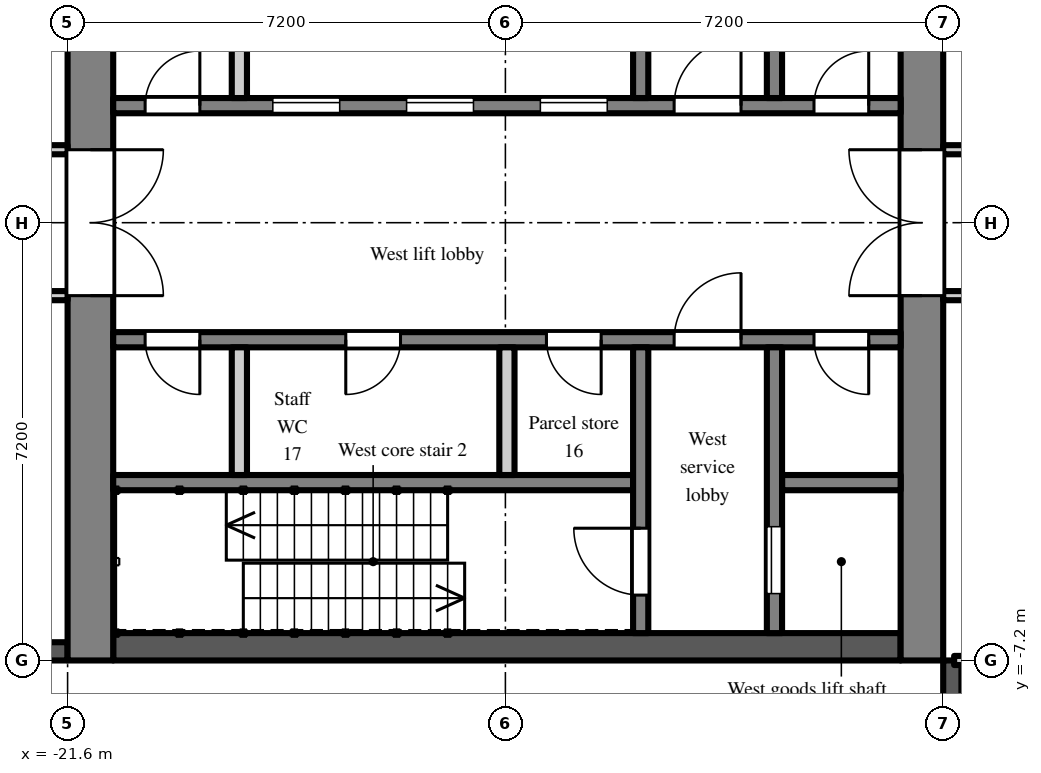
"""IFC4 building model, lengths in metres.
Left out: names, types, materials, properties, quantities, classifications, styles, units other than length and angle.
Written with IfcOpenShell. Run it as: python <this file> out.ifc"""

import sys

from ifc_helpers import new_model, si_unit, direction, frame, frame_2d, origin, place, context, subcontext, project, spatial, rectangle, extrude, element, fill, save


model = new_model("IFC4")
c1 = context("Model", 3, precision=1e-05, world=origin(), true_north=direction((0.0, 1.0)))
c2 = subcontext(c1, "Body", "Model", "MODEL_VIEW")
j1 = project(units=[si_unit("LENGTHUNIT", "METRE"), si_unit("PLANEANGLEUNIT", "RADIAN")], contexts=[c1])
p1 = place(None, origin())
s1 = spatial("IfcSite", under=j1, at=p1, CompositionType="ELEMENT")
p2 = place(p1, origin())
s2 = spatial("IfcBuilding", under=s1, at=p2, CompositionType="ELEMENT")
p3 = place(p2, frame((0.0, 0.0, 162.3)))
s3 = spatial("IfcBuildingStorey", under=s2, at=p3, CompositionType="ELEMENT", Elevation=162.3)
p4 = place(p3, frame((-24.3, -7.05, 0.0), z_axis=(0.0, 0.0, 1.0), x_axis=(1.0, 0.0, 0.0)))
e1 = element("IfcWall", 1, at=p4, inside=s3, PredefinedType="SOLIDWALL", context=c2, shape_type="SweptSolid", body=[
    extrude(rectangle(XDim=2.7, YDim=0.3, at=frame_2d((1.35, 0.0))), origin(), (0.0, 0.0, 1.0), 3.4),
])
p5 = place(p3, frame((-7.05, -7.2, 0.0), z_axis=(0.0, 0.0, 1.0), x_axis=(0.0, -1.0, 0.0)))
e2 = element("IfcWall", 2, at=p5, inside=s3, PredefinedType="SOLIDWALL", context=c2, shape_type="SweptSolid", body=[
    extrude(rectangle(XDim=7.2, YDim=0.3, at=frame_2d((3.6, 0.0))), origin(), (0.0, 0.0, 1.0), 3.8),
])
p6 = place(p3, frame((-7.55, -7.2, 0.0), z_axis=(0.0, 0.0, 1.0), x_axis=(0.0, 1.0, 0.0)))
e3 = element("IfcWall", 3, at=p6, inside=s3, PredefinedType="SHEAR", context=c2, shape_type="SweptSolid", body=[
    extrude(rectangle(XDim=14.4, YDim=0.7, at=frame_2d((7.2, 0.0))), origin(), (0.0, 0.0, 1.0), 3.8),
])
p7 = place(p6, frame((6.0, 0.0, 0.0)))
e4 = element("IfcOpeningElement", 4, at=p7, cuts=e3, PredefinedType="OPENING", context=c2, shape_type="SweptSolid", body=[
    extrude(rectangle(XDim=2.4, YDim=2.2, at=frame_2d((1.2, 1.1))), frame((0.0, 0.36, 0.0), z_axis=(0.0, -1.0, 0.0), x_axis=(1.0, 0.0, 0.0)), (0.0, 0.0, 1.0), 0.72),
])
p8 = place(p3, frame((-21.225, -7.2, 0.0), z_axis=(0.0, 0.0, 1.0), x_axis=(0.0, 1.0, 0.0)))
e5 = element("IfcWall", 5, at=p8, inside=s3, PredefinedType="SHEAR", context=c2, shape_type="SweptSolid", body=[
    extrude(rectangle(XDim=14.4, YDim=0.75, at=frame_2d((7.2, 0.0))), origin(), (0.0, 0.0, 1.0), 3.8),
])
p9 = place(p8, frame((6.0, 0.0, 0.0)))
e6 = element("IfcOpeningElement", 6, at=p9, cuts=e5, PredefinedType="OPENING", context=c2, shape_type="SweptSolid", body=[
    extrude(rectangle(XDim=2.4, YDim=2.2, at=frame_2d((1.2, 1.1))), frame((0.0, 0.385, 0.0), z_axis=(0.0, -1.0, 0.0), x_axis=(1.0, 0.0, 0.0)), (0.0, 0.0, 1.0), 0.77),
])
p10 = place(p3, frame((-7.9, 1.925, 0.0), z_axis=(0.0, 0.0, 1.0), x_axis=(-1.0, 0.0, 0.0)))
e7 = element("IfcWall", 7, at=p10, inside=s3, PredefinedType="SHEAR", context=c2, shape_type="SweptSolid", body=[
    extrude(rectangle(XDim=12.95, YDim=0.25, at=frame_2d((6.475, 0.0))), origin(), (0.0, 0.0, 1.0), 3.8),
])
p11 = place(p10, frame((4.825, 0.0, 0.0)))
e8 = element("IfcOpeningElement", 8, at=p11, cuts=e7, PredefinedType="OPENING", context=c2, shape_type="SweptSolid", body=[
    extrude(rectangle(XDim=1.1, YDim=2.1, at=frame_2d((0.55, 1.05))), frame((0.0, 0.135, 0.0), z_axis=(0.0, -1.0, 0.0), x_axis=(1.0, 0.0, 0.0)), (0.0, 0.0, 1.0), 0.27),
])
p12 = place(p10, frame((7.025, 0.0, 0.0)))
e9 = element("IfcOpeningElement", 9, at=p12, cuts=e7, PredefinedType="OPENING", context=c2, shape_type="SweptSolid", body=[
    extrude(rectangle(XDim=1.1, YDim=2.1, at=frame_2d((0.55, 1.05))), frame((0.0, 0.135, 0.0), z_axis=(0.0, -1.0, 0.0), x_axis=(1.0, 0.0, 0.0)), (0.0, 0.0, 1.0), 0.27),
])
p13 = place(p10, frame((9.225, 0.0, 0.0)))
e10 = element("IfcOpeningElement", 10, at=p13, cuts=e7, PredefinedType="OPENING", context=c2, shape_type="SweptSolid", body=[
    extrude(rectangle(XDim=1.1, YDim=2.1, at=frame_2d((0.55, 1.05))), frame((0.0, 0.135, 0.0), z_axis=(0.0, -1.0, 0.0), x_axis=(1.0, 0.0, 0.0)), (0.0, 0.0, 1.0), 0.27),
])
p14 = place(p10, frame((0.525, 0.0, 0.0)))
e11 = element("IfcOpeningElement", 11, at=p14, cuts=e7, PredefinedType="OPENING", context=c2, shape_type="SweptSolid", body=[
    extrude(rectangle(XDim=0.9, YDim=2.1, at=frame_2d((0.45, 1.05))), frame((0.0, 0.135, 0.0), z_axis=(0.0, -1.0, 0.0), x_axis=(1.0, 0.0, 0.0)), (0.0, 0.0, 1.0), 0.27),
])
p15 = place(p10, frame((2.625, 0.0, 0.0)))
e12 = element("IfcOpeningElement", 12, at=p15, cuts=e7, PredefinedType="OPENING", context=c2, shape_type="SweptSolid", body=[
    extrude(rectangle(XDim=1.1, YDim=2.1, at=frame_2d((0.55, 1.05))), frame((0.0, 0.135, 0.0), z_axis=(0.0, -1.0, 0.0), x_axis=(1.0, 0.0, 0.0)), (0.0, 0.0, 1.0), 0.27),
])
p16 = place(p10, frame((11.525, 0.0, 0.0)))
e13 = element("IfcOpeningElement", 13, at=p16, cuts=e7, PredefinedType="OPENING", context=c2, shape_type="SweptSolid", body=[
    extrude(rectangle(XDim=0.9, YDim=2.1, at=frame_2d((0.45, 1.05))), frame((0.0, 0.135, 0.0), z_axis=(0.0, -1.0, 0.0), x_axis=(1.0, 0.0, 0.0)), (0.0, 0.0, 1.0), 0.27),
])
p17 = place(p3, frame((-9.975, 2.05, 0.0), z_axis=(0.0, 0.0, 1.0), x_axis=(0.0, 1.0, 0.0)))
e14 = element("IfcWall", 14, at=p17, inside=s3, PredefinedType="SHEAR", context=c2, shape_type="SweptSolid", body=[
    extrude(rectangle(XDim=4.7, YDim=0.25, at=frame_2d((2.35, 0.0))), origin(), (0.0, 0.0, 1.0), 3.8),
])
p18 = place(p17, frame((2.95, 0.0, 0.0)))
e15 = element("IfcOpeningElement", 15, at=p18, cuts=e14, PredefinedType="OPENING", context=c2, shape_type="SweptSolid", body=[
    extrude(rectangle(XDim=1.1, YDim=2.1, at=frame_2d((0.55, 1.05))), frame((0.0, 0.135, 0.0), z_axis=(0.0, -1.0, 0.0), x_axis=(1.0, 0.0, 0.0)), (0.0, 0.0, 1.0), 0.27),
])
p19 = place(p3, frame((-12.175, 2.05, 0.0), z_axis=(0.0, 0.0, 1.0), x_axis=(0.0, 1.0, 0.0)))
e16 = element("IfcWall", 16, at=p19, inside=s3, PredefinedType="SHEAR", context=c2, shape_type="SweptSolid", body=[
    extrude(rectangle(XDim=4.7, YDim=0.25, at=frame_2d((2.35, 0.0))), origin(), (0.0, 0.0, 1.0), 3.8),
])
p20 = place(p19, frame((2.975, 0.0, 0.0)))
e17 = element("IfcOpeningElement", 17, at=p20, cuts=e16, PredefinedType="OPENING", context=c2, shape_type="SweptSolid", body=[
    extrude(rectangle(XDim=1.1, YDim=2.1, at=frame_2d((0.55, 1.05))), frame((0.0, 0.135, 0.0), z_axis=(0.0, -1.0, 0.0), x_axis=(1.0, 0.0, 0.0)), (0.0, 0.0, 1.0), 0.27),
])
p21 = place(p3, frame((-18.775, 2.05, 0.0), z_axis=(0.0, 0.0, 1.0), x_axis=(0.0, 1.0, 0.0)))
e18 = element("IfcWall", 18, at=p21, inside=s3, PredefinedType="PARTITIONING", context=c2, shape_type="SweptSolid", body=[
    extrude(rectangle(XDim=2.1, YDim=0.25, at=frame_2d((1.05, 0.0))), origin(), (0.0, 0.0, 1.0), 3.8),
])
p22 = place(p3, frame((-7.9, -6.975, 0.0), z_axis=(0.0, 0.0, 1.0), x_axis=(-1.0, 0.0, 0.0)))
e19 = element("IfcWall", 19, at=p22, inside=s3, PredefinedType="SHEAR", context=c2, shape_type="SweptSolid", body=[
    extrude(rectangle(XDim=12.95, YDim=0.45, at=frame_2d((6.475, 0.0))), origin(), (0.0, 0.0, 1.0), 3.8),
])
p23 = place(p3, frame((-7.9, -1.925, 0.0), z_axis=(0.0, 0.0, 1.0), x_axis=(-1.0, 0.0, 0.0)))
e20 = element("IfcWall", 20, at=p23, inside=s3, PredefinedType="SHEAR", context=c2, shape_type="SweptSolid", body=[
    extrude(rectangle(XDim=12.95, YDim=0.25, at=frame_2d((6.475, 0.0))), origin(), (0.0, 0.0, 1.0), 3.8),
])
p24 = place(p23, frame((0.525, 0.0, 0.0)))
e21 = element("IfcOpeningElement", 21, at=p24, cuts=e20, PredefinedType="OPENING", context=c2, shape_type="SweptSolid", body=[
    extrude(rectangle(XDim=0.9, YDim=2.1, at=frame_2d((0.45, 1.05))), frame((0.0, 0.135, 0.0), z_axis=(0.0, -1.0, 0.0), x_axis=(1.0, 0.0, 0.0)), (0.0, 0.0, 1.0), 0.27),
])
p25 = place(p23, frame((2.625, 0.0, 0.0)))
e22 = element("IfcOpeningElement", 22, at=p25, cuts=e20, PredefinedType="OPENING", context=c2, shape_type="SweptSolid", body=[
    extrude(rectangle(XDim=1.1, YDim=2.1, at=frame_2d((0.55, 1.05))), frame((0.0, 0.135, 0.0), z_axis=(0.0, -1.0, 0.0), x_axis=(1.0, 0.0, 0.0)), (0.0, 0.0, 1.0), 0.27),
])
p26 = place(p23, frame((4.925, 0.0, 0.0)))
e23 = element("IfcOpeningElement", 23, at=p26, cuts=e20, PredefinedType="OPENING", context=c2, shape_type="SweptSolid", body=[
    extrude(rectangle(XDim=0.9, YDim=2.1, at=frame_2d((0.45, 1.05))), frame((0.0, 0.135, 0.0), z_axis=(0.0, -1.0, 0.0), x_axis=(1.0, 0.0, 0.0)), (0.0, 0.0, 1.0), 0.27),
])
p27 = place(p23, frame((8.225, 0.0, 0.0)))
e24 = element("IfcOpeningElement", 24, at=p27, cuts=e20, PredefinedType="OPENING", context=c2, shape_type="SweptSolid", body=[
    extrude(rectangle(XDim=0.9, YDim=2.1, at=frame_2d((0.45, 1.05))), frame((0.0, 0.135, 0.0), z_axis=(0.0, -1.0, 0.0), x_axis=(1.0, 0.0, 0.0)), (0.0, 0.0, 1.0), 0.27),
])
p28 = place(p23, frame((11.525, 0.0, 0.0)))
e25 = element("IfcOpeningElement", 25, at=p28, cuts=e20, PredefinedType="OPENING", context=c2, shape_type="SweptSolid", body=[
    extrude(rectangle(XDim=0.9, YDim=2.1, at=frame_2d((0.45, 1.05))), frame((0.0, 0.135, 0.0), z_axis=(0.0, -1.0, 0.0), x_axis=(1.0, 0.0, 0.0)), (0.0, 0.0, 1.0), 0.27),
])
p29 = place(p3, frame((-7.9, -4.275, 0.0), z_axis=(0.0, 0.0, 1.0), x_axis=(-1.0, 0.0, 0.0)))
e26 = element("IfcWall", 26, at=p29, inside=s3, PredefinedType="SHEAR", context=c2, shape_type="SweptSolid", body=[
    extrude(rectangle(XDim=1.95, YDim=0.25, at=frame_2d((0.975, 0.0))), origin(), (0.0, 0.0, 1.0), 3.8),
])
p30 = place(p3, frame((-12.3, -4.275, 0.0), z_axis=(0.0, 0.0, 1.0), x_axis=(-1.0, 0.0, 0.0)))
e27 = element("IfcWall", 27, at=p30, inside=s3, PredefinedType="SHEAR", context=c2, shape_type="SweptSolid", body=[
    extrude(rectangle(XDim=8.55, YDim=0.25, at=frame_2d((4.275, 0.0))), origin(), (0.0, 0.0, 1.0), 3.8),
])
p31 = place(p3, frame((-9.975, -2.05, 0.0), z_axis=(0.0, 0.0, 1.0), x_axis=(0.0, -1.0, 0.0)))
e28 = element("IfcWall", 28, at=p31, inside=s3, PredefinedType="SHEAR", context=c2, shape_type="SweptSolid", body=[
    extrude(rectangle(XDim=4.7, YDim=0.25, at=frame_2d((2.35, 0.0))), origin(), (0.0, 0.0, 1.0), 3.8),
])
p32 = place(p31, frame((2.95, 0.0, 0.0)))
e29 = element("IfcOpeningElement", 29, at=p32, cuts=e28, PredefinedType="OPENING", context=c2, shape_type="SweptSolid", body=[
    extrude(rectangle(XDim=1.1, YDim=2.1, at=frame_2d((0.55, 1.05))), frame((0.0, 0.135, 0.0), z_axis=(0.0, -1.0, 0.0), x_axis=(1.0, 0.0, 0.0)), (0.0, 0.0, 1.0), 0.27),
])
p33 = place(p3, frame((-12.175, -2.05, 0.0), z_axis=(0.0, 0.0, 1.0), x_axis=(0.0, -1.0, 0.0)))
e30 = element("IfcWall", 30, at=p33, inside=s3, PredefinedType="SHEAR", context=c2, shape_type="SweptSolid", body=[
    extrude(rectangle(XDim=4.7, YDim=0.25, at=frame_2d((2.35, 0.0))), origin(), (0.0, 0.0, 1.0), 3.8),
])
p34 = place(p33, frame((2.975, 0.0, 0.0)))
e31 = element("IfcOpeningElement", 31, at=p34, cuts=e30, PredefinedType="OPENING", context=c2, shape_type="SweptSolid", body=[
    extrude(rectangle(XDim=1.1, YDim=2.1, at=frame_2d((0.55, 1.05))), frame((0.0, 0.135, 0.0), z_axis=(0.0, -1.0, 0.0), x_axis=(1.0, 0.0, 0.0)), (0.0, 0.0, 1.0), 0.27),
])
for number, where, z_axis, x_axis in (
    (32, (-14.375, -2.05, 0.0), (0.0, 0.0, 1.0), (0.0, -1.0, 0.0)),
    (33, (-18.775, -2.05, 0.0), (0.0, 0.0, 1.0), (0.0, -1.0, 0.0)),
):
    element("IfcWall", number, at=place(p3, frame(where, z_axis=z_axis, x_axis=x_axis)), inside=s3, PredefinedType="PARTITIONING", context=c2, shape_type="SweptSolid", body=[
        extrude(rectangle(XDim=2.1, YDim=0.25, at=frame_2d((1.05, 0.0))), origin(), (0.0, 0.0, 1.0), 3.8),
    ])
p35 = place(p3, frame((-36.5, -1.2, 0.0), z_axis=(0.0, 0.0, 1.0), x_axis=(1.0, 0.0, 0.0)))
e34 = element("IfcWall", 34, at=p35, inside=s3, PredefinedType="PARTITIONING", context=c2, shape_type="SweptSolid", body=[
    extrude(rectangle(XDim=14.9, YDim=0.15, at=frame_2d((7.45, 0.0))), origin(), (0.0, 0.0, 1.0), 3.8),
])
p36 = place(p35, frame((10.4, 0.0, 0.0)))
e35 = element("IfcOpeningElement", 35, at=p36, cuts=e34, PredefinedType="OPENING", context=c2, shape_type="SweptSolid", body=[
    extrude(rectangle(XDim=1.8, YDim=2.1, at=frame_2d((0.9, 1.05))), frame((0.0, 0.085, 0.0), z_axis=(0.0, -1.0, 0.0), x_axis=(1.0, 0.0, 0.0)), (0.0, 0.0, 1.0), 0.17),
])
p37 = place(p35, frame((2.95, 0.0, 0.0)))
e36 = element("IfcOpeningElement", 36, at=p37, cuts=e34, PredefinedType="OPENING", context=c2, shape_type="SweptSolid", body=[
    extrude(rectangle(XDim=1.8, YDim=2.1, at=frame_2d((0.9, 1.05))), frame((0.0, 0.085, 0.0), z_axis=(0.0, -1.0, 0.0), x_axis=(1.0, 0.0, 0.0)), (0.0, 0.0, 1.0), 0.17),
])
p38 = place(p3, frame((-36.5, 1.2, 0.0), z_axis=(0.0, 0.0, 1.0), x_axis=(1.0, 0.0, 0.0)))
e37 = element("IfcWall", 37, at=p38, inside=s3, PredefinedType="PARTITIONING", context=c2, shape_type="SweptSolid", body=[
    extrude(rectangle(XDim=14.9, YDim=0.15, at=frame_2d((7.45, 0.0))), origin(), (0.0, 0.0, 1.0), 3.8),
])
p39 = place(p38, frame((10.7, 0.0, 0.0)))
e38 = element("IfcOpeningElement", 38, at=p39, cuts=e37, PredefinedType="OPENING", context=c2, shape_type="SweptSolid", body=[
    extrude(rectangle(XDim=1.2, YDim=2.1, at=frame_2d((0.6, 1.05))), frame((0.0, 0.085, 0.0), z_axis=(0.0, -1.0, 0.0), x_axis=(1.0, 0.0, 0.0)), (0.0, 0.0, 1.0), 0.17),
])
p40 = place(p38, frame((2.95, 0.0, 0.0)))
e39 = element("IfcOpeningElement", 39, at=p40, cuts=e37, PredefinedType="OPENING", context=c2, shape_type="SweptSolid", body=[
    extrude(rectangle(XDim=1.8, YDim=2.1, at=frame_2d((0.9, 1.05))), frame((0.0, 0.085, 0.0), z_axis=(0.0, -1.0, 0.0), x_axis=(1.0, 0.0, 0.0)), (0.0, 0.0, 1.0), 0.17),
])
p41 = place(p3, frame((-7.2, -1.2, 0.0), z_axis=(0.0, 0.0, 1.0), x_axis=(1.0, 0.0, 0.0)))
e40 = element("IfcWall", 40, at=p41, inside=s3, PredefinedType="PARTITIONING", context=c2, shape_type="SweptSolid", body=[
    extrude(rectangle(XDim=5.925, YDim=0.15, at=frame_2d((2.962, 0.0))), origin(), (0.0, 0.0, 1.0), 3.8),
])
p42 = place(p41, frame((0.85, 0.0, 0.0)))
e41 = element("IfcOpeningElement", 41, at=p42, cuts=e40, PredefinedType="OPENING", context=c2, shape_type="SweptSolid", body=[
    extrude(rectangle(XDim=1.2, YDim=2.1, at=frame_2d((0.6, 1.05))), frame((0.0, 0.085, 0.0), z_axis=(0.0, -1.0, 0.0), x_axis=(1.0, 0.0, 0.0)), (0.0, 0.0, 1.0), 0.17),
])
p43 = place(p3, frame((-7.2, 1.2, 0.0), z_axis=(0.0, 0.0, 1.0), x_axis=(1.0, 0.0, 0.0)))
e42 = element("IfcWall", 42, at=p43, inside=s3, PredefinedType="PARTITIONING", context=c2, shape_type="SweptSolid", body=[
    extrude(rectangle(XDim=5.925, YDim=0.15, at=frame_2d((2.962, 0.0))), origin(), (0.0, 0.0, 1.0), 3.8),
])
p44 = place(p43, frame((0.65, 0.0, 0.0)))
e43 = element("IfcOpeningElement", 43, at=p44, cuts=e42, PredefinedType="OPENING", context=c2, shape_type="SweptSolid", body=[
    extrude(rectangle(XDim=1.2, YDim=2.1, at=frame_2d((0.6, 1.05))), frame((0.0, 0.085, 0.0), z_axis=(0.0, -1.0, 0.0), x_axis=(1.0, 0.0, 0.0)), (0.0, 0.0, 1.0), 0.17),
])
p45 = place(p43, frame((4.925, 0.0, 0.0)))
e44 = element("IfcOpeningElement", 44, at=p45, cuts=e42, PredefinedType="OPENING", context=c2, shape_type="SweptSolid", body=[
    extrude(rectangle(XDim=0.9, YDim=2.1, at=frame_2d((0.45, 1.05))), frame((0.0, 0.085, 0.0), z_axis=(0.0, -1.0, 0.0), x_axis=(1.0, 0.0, 0.0)), (0.0, 0.0, 1.0), 0.17),
])
p46 = place(p3, frame((-7.02, -7.2, 0.0), z_axis=(0.0, 0.0, 1.0), x_axis=(1.0, 0.0, 0.0)))
e45 = element("IfcWall", 45, at=p46, inside=s3, PredefinedType="PARTITIONING", context=c2, shape_type="SweptSolid", body=[
    extrude(rectangle(XDim=3.27, YDim=0.15, at=frame_2d((1.635, 0.0))), origin(), (0.0, 0.0, 1.0), 3.4),
])
p47 = place(p11, origin())
e46 = element("IfcDoor", 46, at=p47, inside=s3, OperationType="SLIDING_TO_LEFT", PredefinedType="DOOR", context=c2, shape_type="SweptSolid", body=[
    extrude(rectangle(XDim=1.1, YDim=2.1, at=frame_2d((0.55, 1.05))), frame((0.0, 0.025, 0.0), z_axis=(0.0, -1.0, 0.0), x_axis=(1.0, 0.0, 0.0)), (0.0, 0.0, 1.0), 0.05),
])
fill(e8, e46)
p48 = place(p12, origin())
e47 = element("IfcDoor", 47, at=p48, inside=s3, OperationType="SLIDING_TO_LEFT", PredefinedType="DOOR", context=c2, shape_type="SweptSolid", body=[
    extrude(rectangle(XDim=1.1, YDim=2.1, at=frame_2d((0.55, 1.05))), frame((0.0, 0.025, 0.0), z_axis=(0.0, -1.0, 0.0), x_axis=(1.0, 0.0, 0.0)), (0.0, 0.0, 1.0), 0.05),
])
fill(e9, e47)
p49 = place(p13, origin())
e48 = element("IfcDoor", 48, at=p49, inside=s3, OperationType="SLIDING_TO_LEFT", PredefinedType="DOOR", context=c2, shape_type="SweptSolid", body=[
    extrude(rectangle(XDim=1.1, YDim=2.1, at=frame_2d((0.55, 1.05))), frame((0.0, 0.025, 0.0), z_axis=(0.0, -1.0, 0.0), x_axis=(1.0, 0.0, 0.0)), (0.0, 0.0, 1.0), 0.05),
])
fill(e10, e48)
p50 = place(p32, origin())
e49 = element("IfcDoor", 49, at=p50, inside=s3, OperationType="SLIDING_TO_LEFT", PredefinedType="DOOR", context=c2, shape_type="SweptSolid", body=[
    extrude(rectangle(XDim=1.1, YDim=2.1, at=frame_2d((0.55, 1.05))), frame((0.0, 0.025, 0.0), z_axis=(0.0, -1.0, 0.0), x_axis=(1.0, 0.0, 0.0)), (0.0, 0.0, 1.0), 0.05),
])
fill(e29, e49)
p51 = place(p34, frame((1.1, 0.0, 0.0), z_axis=(0.0, 0.0, 1.0), x_axis=(-1.0, 0.0, 0.0)))
e50 = element("IfcDoor", 50, at=p51, inside=s3, OperationType="SINGLE_SWING_RIGHT", PredefinedType="DOOR", context=c2, shape_type="SweptSolid", body=[
    extrude(rectangle(XDim=1.1, YDim=2.1, at=frame_2d((0.55, 1.05))), frame((0.0, 0.025, 0.0), z_axis=(0.0, -1.0, 0.0), x_axis=(1.0, 0.0, 0.0)), (0.0, 0.0, 1.0), 0.05),
])
fill(e31, e50)
p52 = place(p14, frame((0.9, 0.0, 0.0), z_axis=(0.0, 0.0, 1.0), x_axis=(-1.0, 0.0, 0.0)))
e51 = element("IfcDoor", 51, at=p52, inside=s3, OperationType="SINGLE_SWING_RIGHT", PredefinedType="DOOR", context=c2, shape_type="SweptSolid", body=[
    extrude(rectangle(XDim=0.9, YDim=2.1, at=frame_2d((0.45, 1.05))), frame((0.0, 0.025, 0.0), z_axis=(0.0, -1.0, 0.0), x_axis=(1.0, 0.0, 0.0)), (0.0, 0.0, 1.0), 0.05),
])
fill(e11, e51)
p53 = place(p24, origin())
e52 = element("IfcDoor", 52, at=p53, inside=s3, OperationType="SINGLE_SWING_LEFT", PredefinedType="DOOR", context=c2, shape_type="SweptSolid", body=[
    extrude(rectangle(XDim=0.9, YDim=2.1, at=frame_2d((0.45, 1.05))), frame((0.0, 0.025, 0.0), z_axis=(0.0, -1.0, 0.0), x_axis=(1.0, 0.0, 0.0)), (0.0, 0.0, 1.0), 0.05),
])
fill(e21, e52)
p54 = place(p15, frame((1.1, 0.0, 0.0), z_axis=(0.0, 0.0, 1.0), x_axis=(-1.0, 0.0, 0.0)))
e53 = element("IfcDoor", 53, at=p54, inside=s3, OperationType="SINGLE_SWING_RIGHT", PredefinedType="DOOR", context=c2, shape_type="SweptSolid", body=[
    extrude(rectangle(XDim=1.1, YDim=2.1, at=frame_2d((0.55, 1.05))), frame((0.0, 0.025, 0.0), z_axis=(0.0, -1.0, 0.0), x_axis=(1.0, 0.0, 0.0)), (0.0, 0.0, 1.0), 0.05),
])
fill(e12, e53)
p55 = place(p25, frame((1.1, 0.0, 0.0), z_axis=(0.0, 0.0, 1.0), x_axis=(-1.0, 0.0, 0.0)))
e54 = element("IfcDoor", 54, at=p55, inside=s3, OperationType="SINGLE_SWING_RIGHT", PredefinedType="DOOR", context=c2, shape_type="SweptSolid", body=[
    extrude(rectangle(XDim=1.1, YDim=2.1, at=frame_2d((0.55, 1.05))), frame((0.0, 0.025, 0.0), z_axis=(0.0, -1.0, 0.0), x_axis=(1.0, 0.0, 0.0)), (0.0, 0.0, 1.0), 0.05),
])
fill(e22, e54)
p56 = place(p7, origin())
e55 = element("IfcDoor", 55, at=p56, inside=s3, OperationType="DOUBLE_DOOR_DOUBLE_SWING", PredefinedType="DOOR", context=c2, shape_type="SweptSolid", body=[
    extrude(rectangle(XDim=2.4, YDim=2.2, at=frame_2d((1.2, 1.1))), frame((0.0, 0.025, 0.0), z_axis=(0.0, -1.0, 0.0), x_axis=(1.0, 0.0, 0.0)), (0.0, 0.0, 1.0), 0.05),
])
fill(e4, e55)
p57 = place(p9, frame((2.4, 0.0, 0.0), z_axis=(0.0, 0.0, 1.0), x_axis=(-1.0, 0.0, 0.0)))
e56 = element("IfcDoor", 56, at=p57, inside=s3, OperationType="DOUBLE_DOOR_DOUBLE_SWING", PredefinedType="DOOR", context=c2, shape_type="SweptSolid", body=[
    extrude(rectangle(XDim=2.4, YDim=2.2, at=frame_2d((1.2, 1.1))), frame((0.0, 0.025, 0.0), z_axis=(0.0, -1.0, 0.0), x_axis=(1.0, 0.0, 0.0)), (0.0, 0.0, 1.0), 0.05),
])
fill(e6, e56)
p58 = place(p16, frame((0.9, 0.0, 0.0), z_axis=(0.0, 0.0, 1.0), x_axis=(-1.0, 0.0, 0.0)))
e57 = element("IfcDoor", 57, at=p58, inside=s3, OperationType="SINGLE_SWING_RIGHT", PredefinedType="DOOR", context=c2, shape_type="SweptSolid", body=[
    extrude(rectangle(XDim=0.9, YDim=2.1, at=frame_2d((0.45, 1.05))), frame((0.0, 0.025, 0.0), z_axis=(0.0, -1.0, 0.0), x_axis=(1.0, 0.0, 0.0)), (0.0, 0.0, 1.0), 0.05),
])
fill(e13, e57)
p59 = place(p26, origin())
e58 = element("IfcDoor", 58, at=p59, inside=s3, OperationType="SINGLE_SWING_LEFT", PredefinedType="DOOR", context=c2, shape_type="SweptSolid", body=[
    extrude(rectangle(XDim=0.9, YDim=2.1, at=frame_2d((0.45, 1.05))), frame((0.0, 0.025, 0.0), z_axis=(0.0, -1.0, 0.0), x_axis=(1.0, 0.0, 0.0)), (0.0, 0.0, 1.0), 0.05),
])
fill(e23, e58)
p60 = place(p27, origin())
e59 = element("IfcDoor", 59, at=p60, inside=s3, OperationType="SINGLE_SWING_RIGHT", PredefinedType="DOOR", context=c2, shape_type="SweptSolid", body=[
    extrude(rectangle(XDim=0.9, YDim=2.1, at=frame_2d((0.45, 1.05))), frame((0.0, 0.025, 0.0), z_axis=(0.0, -1.0, 0.0), x_axis=(1.0, 0.0, 0.0)), (0.0, 0.0, 1.0), 0.05),
])
fill(e24, e59)
p61 = place(p28, origin())
e60 = element("IfcDoor", 60, at=p61, inside=s3, OperationType="SINGLE_SWING_LEFT", PredefinedType="DOOR", context=c2, shape_type="SweptSolid", body=[
    extrude(rectangle(XDim=0.9, YDim=2.1, at=frame_2d((0.45, 1.05))), frame((0.0, 0.025, 0.0), z_axis=(0.0, -1.0, 0.0), x_axis=(1.0, 0.0, 0.0)), (0.0, 0.0, 1.0), 0.05),
])
fill(e25, e60)
save(model, sys.argv[1])
